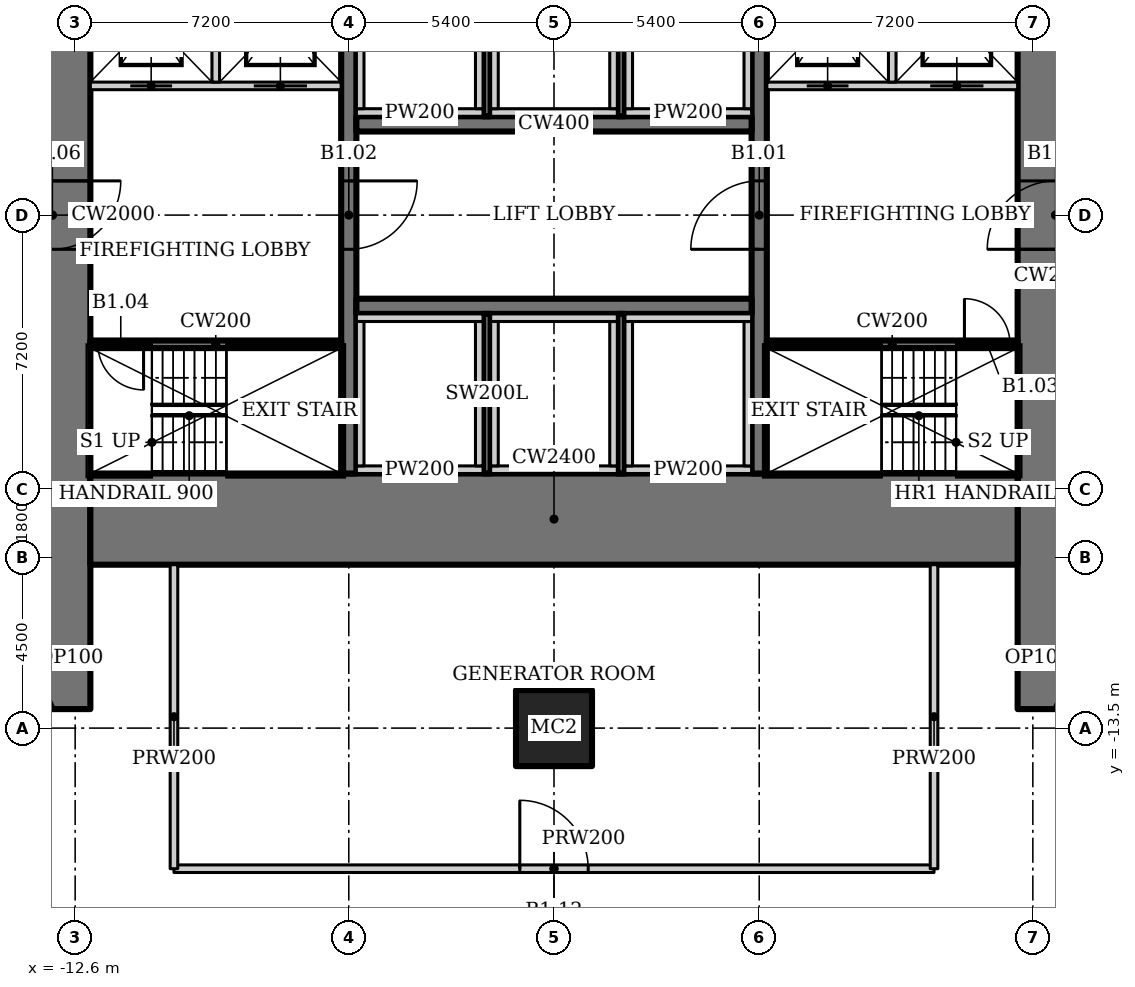
"""IFC4 building model, lengths in metres.
Left out: names, types, materials, properties, quantities, classifications, styles, units other than length and angle.
Written with IfcOpenShell. Run it as: python <this file> out.ifc"""

import sys

from ifc_helpers import new_model, si_unit, direction, frame, frame_2d, origin, origin_2d, place, context, subcontext, project, spatial, rectangle, hollow_rectangle, extrude, element, fill, save


model = new_model("IFC4")
c1 = context("Model", 3, precision=1e-05, world=origin(), true_north=direction((0.0, 1.0)))
c2 = subcontext(c1, "Body", "Model", "MODEL_VIEW")
j1 = project(units=[si_unit("LENGTHUNIT", "METRE"), si_unit("PLANEANGLEUNIT", "RADIAN")], contexts=[c1])
p1 = place(None, origin())
s1 = spatial("IfcSite", under=j1, at=p1, CompositionType="ELEMENT")
p2 = place(p1, origin())
s2 = spatial("IfcBuilding", under=s1, at=p2, CompositionType="ELEMENT")
p3 = place(p2, frame((0.0, 0.0, -5.5)))
s3 = spatial("IfcBuildingStorey", under=s2, at=p3, CompositionType="ELEMENT", Elevation=-5.5)
p4 = place(p3, frame((0.0, -13.5, 0.0), z_axis=(0.0, 0.0, 1.0), x_axis=(1.0, 0.0, 0.0)))
e1 = element("IfcColumn", 1, at=p4, inside=s3, PredefinedType="COLUMN", context=c2, shape_type="SweptSolid", body=[
    extrude(hollow_rectangle(XDim=2.0, YDim=2.0, WallThickness=0.17, at=origin_2d()), origin(), (0.0, 0.0, 1.0), 5.5),
])
p5 = place(p3, frame((13.2, -13.0, 0.0), z_axis=(0.0, 0.0, 1.0), x_axis=(0.0, 1.0, 0.0)))
e2 = element("IfcWall", 2, at=p5, inside=s3, PredefinedType="SHEAR", context=c2, shape_type="SweptSolid", body=[
    extrude(rectangle(XDim=26.0, YDim=2.0, at=frame_2d((13.0, 0.0))), origin(), (0.0, 0.0, 1.0), 5.5),
])
p6 = place(p5, frame((12.1, 0.0, 0.0)))
e3 = element("IfcOpeningElement", 3, at=p6, cuts=e2, PredefinedType="OPENING", context=c2, shape_type="SweptSolid", body=[
    extrude(rectangle(XDim=1.8, YDim=2.1, at=frame_2d((0.9, 1.05))), frame((0.0, 1.01, 0.0), z_axis=(0.0, -1.0, 0.0), x_axis=(1.0, 0.0, 0.0)), (0.0, 0.0, 1.0), 2.02),
])
p7 = place(p3, frame((-13.2, 13.0, 0.0), z_axis=(0.0, 0.0, 1.0), x_axis=(0.0, -1.0, 0.0)))
e4 = element("IfcWall", 4, at=p7, inside=s3, PredefinedType="SHEAR", context=c2, shape_type="SweptSolid", body=[
    extrude(rectangle(XDim=26.0, YDim=2.0, at=frame_2d((13.0, 0.0))), origin(), (0.0, 0.0, 1.0), 5.5),
])
p8 = place(p7, frame((12.1, 0.0, 0.0)))
e5 = element("IfcOpeningElement", 5, at=p8, cuts=e4, PredefinedType="OPENING", context=c2, shape_type="SweptSolid", body=[
    extrude(rectangle(XDim=1.8, YDim=2.1, at=frame_2d((0.9, 1.05))), frame((0.0, 1.01, 0.0), z_axis=(0.0, -1.0, 0.0), x_axis=(1.0, 0.0, 0.0)), (0.0, 0.0, 1.0), 2.02),
])
p9 = place(p3, frame((-12.2, -8.0, 0.0), z_axis=(0.0, 0.0, 1.0), x_axis=(1.0, 0.0, 0.0)))
e6 = element("IfcWall", 6, at=p9, inside=s3, PredefinedType="SHEAR", context=c2, shape_type="SweptSolid", body=[
    extrude(rectangle(XDim=24.4, YDim=2.4, at=frame_2d((12.2, 0.0))), origin(), (0.0, 0.0, 1.0), 5.5),
])
p10 = place(p3, frame((5.4, -6.8, 0.0), z_axis=(0.0, 0.0, 1.0), x_axis=(0.0, 1.0, 0.0)))
e7 = element("IfcWall", 7, at=p10, inside=s3, PredefinedType="SHEAR", context=c2, shape_type="SweptSolid", body=[
    extrude(rectangle(XDim=13.6, YDim=0.4, at=frame_2d((6.8, 0.0))), origin(), (0.0, 0.0, 1.0), 5.5),
])
p11 = place(p10, frame((5.9, 0.0, 0.0)))
e8 = element("IfcOpeningElement", 8, at=p11, cuts=e7, PredefinedType="OPENING", context=c2, shape_type="SweptSolid", body=[
    extrude(rectangle(XDim=1.8, YDim=2.1, at=frame_2d((0.9, 1.05))), frame((0.0, 0.21, 0.0), z_axis=(0.0, -1.0, 0.0), x_axis=(1.0, 0.0, 0.0)), (0.0, 0.0, 1.0), 0.42),
])
p12 = place(p3, frame((-5.4, 6.8, 0.0), z_axis=(0.0, 0.0, 1.0), x_axis=(0.0, -1.0, 0.0)))
e9 = element("IfcWall", 9, at=p12, inside=s3, PredefinedType="SHEAR", context=c2, shape_type="SweptSolid", body=[
    extrude(rectangle(XDim=13.6, YDim=0.4, at=frame_2d((6.8, 0.0))), origin(), (0.0, 0.0, 1.0), 5.5),
])
p13 = place(p12, frame((5.9, 0.0, 0.0)))
e10 = element("IfcOpeningElement", 10, at=p13, cuts=e9, PredefinedType="OPENING", context=c2, shape_type="SweptSolid", body=[
    extrude(rectangle(XDim=1.8, YDim=2.1, at=frame_2d((0.9, 1.05))), frame((0.0, 0.21, 0.0), z_axis=(0.0, -1.0, 0.0), x_axis=(1.0, 0.0, 0.0)), (0.0, 0.0, 1.0), 0.42),
])
p14 = place(p3, frame((-5.2, -2.4, 0.0), z_axis=(0.0, 0.0, 1.0), x_axis=(1.0, 0.0, 0.0)))
e11 = element("IfcWall", 11, at=p14, inside=s3, PredefinedType="SHEAR", context=c2, shape_type="SweptSolid", body=[
    extrude(rectangle(XDim=10.4, YDim=0.4, at=frame_2d((5.2, 0.0))), origin(), (0.0, 0.0, 1.0), 5.5),
])
for number, where, z_axis, x_axis in (
    (12, (-1.767, -2.6, 0.0), (0.0, 0.0, 1.0), (0.0, -1.0, 0.0)),
    (13, (1.767, -2.6, 0.0), (0.0, 0.0, 1.0), (0.0, -1.0, 0.0)),
):
    element("IfcWall", number, at=place(p3, frame(where, z_axis=z_axis, x_axis=x_axis)), inside=s3, PredefinedType="SOLIDWALL", context=c2, shape_type="SweptSolid", body=[
        extrude(rectangle(XDim=4.2, YDim=0.2, at=frame_2d((2.1, 0.0))), origin(), (0.0, 0.0, 1.0), 5.5),
    ])
p15 = place(p3, frame((5.2, 2.4, 0.0), z_axis=(0.0, 0.0, 1.0), x_axis=(-1.0, 0.0, 0.0)))
e14 = element("IfcWall", 14, at=p15, inside=s3, PredefinedType="SHEAR", context=c2, shape_type="SweptSolid", body=[
    extrude(rectangle(XDim=10.4, YDim=0.4, at=frame_2d((5.2, 0.0))), origin(), (0.0, 0.0, 1.0), 5.5),
])
for number, where, z_axis, x_axis in (
    (15, (-1.767, 2.6, 0.0), (0.0, 0.0, 1.0), (0.0, 1.0, 0.0)),
    (16, (1.767, 2.6, 0.0), (0.0, 0.0, 1.0), (0.0, 1.0, 0.0)),
):
    element("IfcWall", number, at=place(p3, frame(where, z_axis=z_axis, x_axis=x_axis)), inside=s3, PredefinedType="SOLIDWALL", context=c2, shape_type="SweptSolid", body=[
        extrude(rectangle(XDim=4.2, YDim=0.2, at=frame_2d((2.1, 0.0))), origin(), (0.0, 0.0, 1.0), 5.5),
    ])
p16 = place(p3, frame((5.6, -3.4, 0.0), z_axis=(0.0, 0.0, 1.0), x_axis=(1.0, 0.0, 0.0)))
e17 = element("IfcWall", 17, at=p16, inside=s3, PredefinedType="SHEAR", context=c2, shape_type="SweptSolid", body=[
    extrude(rectangle(XDim=6.6, YDim=0.2, at=frame_2d((3.3, 0.0))), origin(), (0.0, 0.0, 1.0), 5.5),
])
p17 = place(p16, frame((5.2, 0.0, 0.0)))
e18 = element("IfcOpeningElement", 18, at=p17, cuts=e17, PredefinedType="OPENING", context=c2, shape_type="SweptSolid", body=[
    extrude(rectangle(XDim=1.2, YDim=2.1, at=frame_2d((0.6, 1.05))), frame((0.0, 0.11, 0.0), z_axis=(0.0, -1.0, 0.0), x_axis=(1.0, 0.0, 0.0)), (0.0, 0.0, 1.0), 0.22),
])
p18 = place(p3, frame((12.2, 3.4, 0.0), z_axis=(0.0, 0.0, 1.0), x_axis=(-1.0, 0.0, 0.0)))
e19 = element("IfcWall", 19, at=p18, inside=s3, PredefinedType="SOLIDWALL", context=c2, shape_type="SweptSolid", body=[
    extrude(rectangle(XDim=6.6, YDim=0.2, at=frame_2d((3.3, 0.0))), origin(), (0.0, 0.0, 1.0), 5.5),
])
p19 = place(p18, frame((4.45, 0.0, 0.0)))
e20 = element("IfcOpeningElement", 20, at=p19, cuts=e19, PredefinedType="OPENING", context=c2, shape_type="SweptSolid", body=[
    extrude(rectangle(XDim=1.1, YDim=2.2, at=frame_2d((0.55, 1.1))), frame((0.0, 0.11, 0.0), z_axis=(0.0, -1.0, 0.0), x_axis=(1.0, 0.0, 0.0)), (0.0, 0.0, 1.0), 0.22),
])
p20 = place(p18, frame((0.9, 0.0, 0.0)))
e21 = element("IfcOpeningElement", 21, at=p20, cuts=e19, PredefinedType="OPENING", context=c2, shape_type="SweptSolid", body=[
    extrude(rectangle(XDim=1.4, YDim=2.2, at=frame_2d((0.7, 1.1))), frame((0.0, 0.11, 0.0), z_axis=(0.0, -1.0, 0.0), x_axis=(1.0, 0.0, 0.0)), (0.0, 0.0, 1.0), 0.22),
])
p21 = place(p3, frame((8.9, 3.5, 0.0), z_axis=(0.0, 0.0, 1.0), x_axis=(0.0, 1.0, 0.0)))
e22 = element("IfcWall", 22, at=p21, inside=s3, PredefinedType="SOLIDWALL", context=c2, shape_type="SweptSolid", body=[
    extrude(rectangle(XDim=3.3, YDim=0.2, at=frame_2d((1.65, 0.0))), origin(), (0.0, 0.0, 1.0), 5.5),
])
p22 = place(p3, frame((-5.6, -3.4, 0.0), z_axis=(0.0, 0.0, 1.0), x_axis=(-1.0, 0.0, 0.0)))
e23 = element("IfcWall", 23, at=p22, inside=s3, PredefinedType="SHEAR", context=c2, shape_type="SweptSolid", body=[
    extrude(rectangle(XDim=6.6, YDim=0.2, at=frame_2d((3.3, 0.0))), origin(), (0.0, 0.0, 1.0), 5.5),
])
p23 = place(p22, frame((5.2, 0.0, 0.0)))
e24 = element("IfcOpeningElement", 24, at=p23, cuts=e23, PredefinedType="OPENING", context=c2, shape_type="SweptSolid", body=[
    extrude(rectangle(XDim=1.2, YDim=2.1, at=frame_2d((0.6, 1.05))), frame((0.0, 0.11, 0.0), z_axis=(0.0, -1.0, 0.0), x_axis=(1.0, 0.0, 0.0)), (0.0, 0.0, 1.0), 0.22),
])
p24 = place(p3, frame((-12.2, 3.4, 0.0), z_axis=(0.0, 0.0, 1.0), x_axis=(1.0, 0.0, 0.0)))
e25 = element("IfcWall", 25, at=p24, inside=s3, PredefinedType="SOLIDWALL", context=c2, shape_type="SweptSolid", body=[
    extrude(rectangle(XDim=6.6, YDim=0.2, at=frame_2d((3.3, 0.0))), origin(), (0.0, 0.0, 1.0), 5.5),
])
p25 = place(p24, frame((1.05, 0.0, 0.0)))
e26 = element("IfcOpeningElement", 26, at=p25, cuts=e25, PredefinedType="OPENING", context=c2, shape_type="SweptSolid", body=[
    extrude(rectangle(XDim=1.1, YDim=2.2, at=frame_2d((0.55, 1.1))), frame((0.0, 0.11, 0.0), z_axis=(0.0, -1.0, 0.0), x_axis=(1.0, 0.0, 0.0)), (0.0, 0.0, 1.0), 0.22),
])
p26 = place(p24, frame((4.3, 0.0, 0.0)))
e27 = element("IfcOpeningElement", 27, at=p26, cuts=e25, PredefinedType="OPENING", context=c2, shape_type="SweptSolid", body=[
    extrude(rectangle(XDim=1.4, YDim=2.2, at=frame_2d((0.7, 1.1))), frame((0.0, 0.11, 0.0), z_axis=(0.0, -1.0, 0.0), x_axis=(1.0, 0.0, 0.0)), (0.0, 0.0, 1.0), 0.22),
])
p27 = place(p3, frame((-8.9, 3.5, 0.0), z_axis=(0.0, 0.0, 1.0), x_axis=(0.0, 1.0, 0.0)))
e28 = element("IfcWall", 28, at=p27, inside=s3, PredefinedType="SOLIDWALL", context=c2, shape_type="SweptSolid", body=[
    extrude(rectangle(XDim=3.3, YDim=0.2, at=frame_2d((1.65, 0.0))), origin(), (0.0, 0.0, 1.0), 5.5),
])
p28 = place(p3, frame((-10.0, -17.2, 0.0), z_axis=(0.0, 0.0, 1.0), x_axis=(1.0, 0.0, 0.0)))
e29 = element("IfcWall", 29, at=p28, inside=s3, PredefinedType="SOLIDWALL", context=c2, shape_type="SweptSolid", body=[
    extrude(rectangle(XDim=20.0, YDim=0.2, at=frame_2d((10.0, 0.0))), origin(), (0.0, 0.0, 1.0), 5.05),
])
p29 = place(p28, frame((9.1, 0.0, 0.0)))
e30 = element("IfcOpeningElement", 30, at=p29, cuts=e29, PredefinedType="OPENING", context=c2, shape_type="SweptSolid", body=[
    extrude(rectangle(XDim=1.8, YDim=2.1, at=frame_2d((0.9, 1.05))), frame((0.0, 0.11, 0.0), z_axis=(0.0, -1.0, 0.0), x_axis=(1.0, 0.0, 0.0)), (0.0, 0.0, 1.0), 0.22),
])
for number, where, z_axis, x_axis in (
    (31, (-10.0, -9.2, 0.0), (0.0, 0.0, 1.0), (0.0, -1.0, 0.0)),
    (32, (10.0, -9.2, 0.0), (0.0, 0.0, 1.0), (0.0, -1.0, 0.0)),
):
    element("IfcWall", number, at=place(p3, frame(where, z_axis=z_axis, x_axis=x_axis)), inside=s3, PredefinedType="SOLIDWALL", context=c2, shape_type="SweptSolid", body=[
        extrude(rectangle(XDim=8.0, YDim=0.2, at=frame_2d((4.0, 0.0))), origin(), (0.0, 0.0, 1.0), 5.05),
    ])
for number, where, z_axis, x_axis in (
    (33, (13.2, -13.0, 0.0), (0.0, 0.0, 1.0), (0.42, 0.907, 0.0)),
    (34, (-13.2, -13.0, 0.0), (0.0, 0.0, 1.0), (-0.42, 0.907, 0.0)),
):
    element("IfcWall", number, at=place(p3, frame(where, z_axis=z_axis, x_axis=x_axis)), inside=s3, PredefinedType="PARTITIONING", context=c2, shape_type="SweptSolid", body=[
        extrude(rectangle(XDim=2.975, YDim=0.1, at=frame_2d((1.488, 0.0))), origin(), (0.0, 0.0, 1.0), 5.05),
    ])
p30 = place(p3, frame((-5.2, 2.7, 3.7), z_axis=(0.0, 0.0, 1.0), x_axis=(1.0, 0.0, 0.0)))
e35 = element("IfcWall", 35, at=p30, inside=s3, PredefinedType="SOLIDWALL", context=c2, shape_type="SweptSolid", body=[
    extrude(rectangle(XDim=3.333, YDim=0.2, at=frame_2d((1.667, 0.0))), origin(), (0.0, 0.0, 1.0), 1.35),
])
for number, where, z_axis, x_axis in (
    (36, (-1.967, 2.8, 3.7), (0.0, 0.0, 1.0), (0.0, 1.0, 0.0)),
    (37, (-5.1, 6.6, 3.7), (0.0, 0.0, 1.0), (0.0, -1.0, 0.0)),
):
    element("IfcWall", number, at=place(p3, frame(where, z_axis=z_axis, x_axis=x_axis)), inside=s3, PredefinedType="SOLIDWALL", context=c2, shape_type="SweptSolid", body=[
        extrude(rectangle(XDim=3.8, YDim=0.2, at=frame_2d((1.9, 0.0))), origin(), (0.0, 0.0, 1.0), 1.35),
    ])
p31 = place(p3, frame((-5.2, -6.7, 3.7), z_axis=(0.0, 0.0, 1.0), x_axis=(1.0, 0.0, 0.0)))
e38 = element("IfcWall", 38, at=p31, inside=s3, PredefinedType="SOLIDWALL", context=c2, shape_type="SweptSolid", body=[
    extrude(rectangle(XDim=3.333, YDim=0.2, at=frame_2d((1.667, 0.0))), origin(), (0.0, 0.0, 1.0), 1.35),
])
p32 = place(p3, frame((-1.967, -6.6, 3.7), z_axis=(0.0, 0.0, 1.0), x_axis=(0.0, 1.0, 0.0)))
e39 = element("IfcWall", 39, at=p32, inside=s3, PredefinedType="SOLIDWALL", context=c2, shape_type="SweptSolid", body=[
    extrude(rectangle(XDim=3.8, YDim=0.2, at=frame_2d((1.9, 0.0))), origin(), (0.0, 0.0, 1.0), 1.35),
])
p33 = place(p3, frame((-1.867, -2.7, 3.7), z_axis=(0.0, 0.0, 1.0), x_axis=(-1.0, 0.0, 0.0)))
e40 = element("IfcWall", 40, at=p33, inside=s3, PredefinedType="SOLIDWALL", context=c2, shape_type="SweptSolid", body=[
    extrude(rectangle(XDim=3.333, YDim=0.2, at=frame_2d((1.667, 0.0))), origin(), (0.0, 0.0, 1.0), 1.35),
])
p34 = place(p3, frame((-5.1, -2.8, 3.7), z_axis=(0.0, 0.0, 1.0), x_axis=(0.0, -1.0, 0.0)))
e41 = element("IfcWall", 41, at=p34, inside=s3, PredefinedType="SOLIDWALL", context=c2, shape_type="SweptSolid", body=[
    extrude(rectangle(XDim=3.8, YDim=0.2, at=frame_2d((1.9, 0.0))), origin(), (0.0, 0.0, 1.0), 1.35),
])
p35 = place(p3, frame((-1.667, 2.7, 3.7), z_axis=(0.0, 0.0, 1.0), x_axis=(1.0, 0.0, 0.0)))
e42 = element("IfcWall", 42, at=p35, inside=s3, PredefinedType="SOLIDWALL", context=c2, shape_type="SweptSolid", body=[
    extrude(rectangle(XDim=3.333, YDim=0.2, at=frame_2d((1.667, 0.0))), origin(), (0.0, 0.0, 1.0), 1.35),
])
for number, where, z_axis, x_axis in (
    (43, (1.567, 2.8, 3.7), (0.0, 0.0, 1.0), (0.0, 1.0, 0.0)),
    (44, (-1.567, 6.6, 3.7), (0.0, 0.0, 1.0), (0.0, -1.0, 0.0)),
):
    element("IfcWall", number, at=place(p3, frame(where, z_axis=z_axis, x_axis=x_axis)), inside=s3, PredefinedType="SOLIDWALL", context=c2, shape_type="SweptSolid", body=[
        extrude(rectangle(XDim=3.8, YDim=0.2, at=frame_2d((1.9, 0.0))), origin(), (0.0, 0.0, 1.0), 1.35),
    ])
p36 = place(p3, frame((-1.667, -6.7, 3.7), z_axis=(0.0, 0.0, 1.0), x_axis=(1.0, 0.0, 0.0)))
e45 = element("IfcWall", 45, at=p36, inside=s3, PredefinedType="SOLIDWALL", context=c2, shape_type="SweptSolid", body=[
    extrude(rectangle(XDim=3.333, YDim=0.2, at=frame_2d((1.667, 0.0))), origin(), (0.0, 0.0, 1.0), 1.35),
])
p37 = place(p3, frame((1.567, -6.6, 3.7), z_axis=(0.0, 0.0, 1.0), x_axis=(0.0, 1.0, 0.0)))
e46 = element("IfcWall", 46, at=p37, inside=s3, PredefinedType="SOLIDWALL", context=c2, shape_type="SweptSolid", body=[
    extrude(rectangle(XDim=3.8, YDim=0.2, at=frame_2d((1.9, 0.0))), origin(), (0.0, 0.0, 1.0), 1.35),
])
p38 = place(p3, frame((1.667, -2.7, 3.7), z_axis=(0.0, 0.0, 1.0), x_axis=(-1.0, 0.0, 0.0)))
e47 = element("IfcWall", 47, at=p38, inside=s3, PredefinedType="SOLIDWALL", context=c2, shape_type="SweptSolid", body=[
    extrude(rectangle(XDim=3.333, YDim=0.2, at=frame_2d((1.667, 0.0))), origin(), (0.0, 0.0, 1.0), 1.35),
])
p39 = place(p3, frame((-1.567, -2.8, 3.7), z_axis=(0.0, 0.0, 1.0), x_axis=(0.0, -1.0, 0.0)))
e48 = element("IfcWall", 48, at=p39, inside=s3, PredefinedType="SOLIDWALL", context=c2, shape_type="SweptSolid", body=[
    extrude(rectangle(XDim=3.8, YDim=0.2, at=frame_2d((1.9, 0.0))), origin(), (0.0, 0.0, 1.0), 1.35),
])
p40 = place(p3, frame((1.867, 2.7, 3.7), z_axis=(0.0, 0.0, 1.0), x_axis=(1.0, 0.0, 0.0)))
e49 = element("IfcWall", 49, at=p40, inside=s3, PredefinedType="SOLIDWALL", context=c2, shape_type="SweptSolid", body=[
    extrude(rectangle(XDim=3.333, YDim=0.2, at=frame_2d((1.667, 0.0))), origin(), (0.0, 0.0, 1.0), 1.35),
])
for number, where, z_axis, x_axis in (
    (50, (5.1, 2.8, 3.7), (0.0, 0.0, 1.0), (0.0, 1.0, 0.0)),
    (51, (1.967, 6.6, 3.7), (0.0, 0.0, 1.0), (0.0, -1.0, 0.0)),
):
    element("IfcWall", number, at=place(p3, frame(where, z_axis=z_axis, x_axis=x_axis)), inside=s3, PredefinedType="SOLIDWALL", context=c2, shape_type="SweptSolid", body=[
        extrude(rectangle(XDim=3.8, YDim=0.2, at=frame_2d((1.9, 0.0))), origin(), (0.0, 0.0, 1.0), 1.35),
    ])
p41 = place(p3, frame((1.867, -6.7, 3.7), z_axis=(0.0, 0.0, 1.0), x_axis=(1.0, 0.0, 0.0)))
e52 = element("IfcWall", 52, at=p41, inside=s3, PredefinedType="SOLIDWALL", context=c2, shape_type="SweptSolid", body=[
    extrude(rectangle(XDim=3.333, YDim=0.2, at=frame_2d((1.667, 0.0))), origin(), (0.0, 0.0, 1.0), 1.35),
])
p42 = place(p3, frame((5.1, -6.6, 3.7), z_axis=(0.0, 0.0, 1.0), x_axis=(0.0, 1.0, 0.0)))
e53 = element("IfcWall", 53, at=p42, inside=s3, PredefinedType="SOLIDWALL", context=c2, shape_type="SweptSolid", body=[
    extrude(rectangle(XDim=3.8, YDim=0.2, at=frame_2d((1.9, 0.0))), origin(), (0.0, 0.0, 1.0), 1.35),
])
p43 = place(p3, frame((5.2, -2.7, 3.7), z_axis=(0.0, 0.0, 1.0), x_axis=(-1.0, 0.0, 0.0)))
e54 = element("IfcWall", 54, at=p43, inside=s3, PredefinedType="SOLIDWALL", context=c2, shape_type="SweptSolid", body=[
    extrude(rectangle(XDim=3.333, YDim=0.2, at=frame_2d((1.667, 0.0))), origin(), (0.0, 0.0, 1.0), 1.35),
])
p44 = place(p3, frame((1.967, -2.8, 3.7), z_axis=(0.0, 0.0, 1.0), x_axis=(0.0, -1.0, 0.0)))
e55 = element("IfcWall", 55, at=p44, inside=s3, PredefinedType="SOLIDWALL", context=c2, shape_type="SweptSolid", body=[
    extrude(rectangle(XDim=3.8, YDim=0.2, at=frame_2d((1.9, 0.0))), origin(), (0.0, 0.0, 1.0), 1.35),
])
p45 = place(p11, origin())
e56 = element("IfcDoor", 56, at=p45, inside=s3, OperationType="DOUBLE_DOOR_DOUBLE_SWING", PredefinedType="DOOR", context=c2, shape_type="SweptSolid", body=[
    extrude(rectangle(XDim=1.8, YDim=2.1, at=frame_2d((0.9, 1.05))), frame((0.0, 0.025, 0.0), z_axis=(0.0, -1.0, 0.0), x_axis=(1.0, 0.0, 0.0)), (0.0, 0.0, 1.0), 0.05),
])
fill(e8, e56)
p46 = place(p13, origin())
e57 = element("IfcDoor", 57, at=p46, inside=s3, OperationType="DOUBLE_DOOR_DOUBLE_SWING", PredefinedType="DOOR", context=c2, shape_type="SweptSolid", body=[
    extrude(rectangle(XDim=1.8, YDim=2.1, at=frame_2d((0.9, 1.05))), frame((0.0, 0.025, 0.0), z_axis=(0.0, -1.0, 0.0), x_axis=(1.0, 0.0, 0.0)), (0.0, 0.0, 1.0), 0.05),
])
fill(e10, e57)
p47 = place(p17, origin())
e58 = element("IfcDoor", 58, at=p47, inside=s3, OperationType="SINGLE_SWING_RIGHT", PredefinedType="DOOR", context=c2, shape_type="SweptSolid", body=[
    extrude(rectangle(XDim=1.2, YDim=2.1, at=frame_2d((0.6, 1.05))), frame((0.0, 0.025, 0.0), z_axis=(0.0, -1.0, 0.0), x_axis=(1.0, 0.0, 0.0)), (0.0, 0.0, 1.0), 0.05),
])
fill(e18, e58)
p48 = place(p23, origin())
e59 = element("IfcDoor", 59, at=p48, inside=s3, OperationType="SINGLE_SWING_RIGHT", PredefinedType="DOOR", context=c2, shape_type="SweptSolid", body=[
    extrude(rectangle(XDim=1.2, YDim=2.1, at=frame_2d((0.6, 1.05))), frame((0.0, 0.025, 0.0), z_axis=(0.0, -1.0, 0.0), x_axis=(1.0, 0.0, 0.0)), (0.0, 0.0, 1.0), 0.05),
])
fill(e24, e59)
p49 = place(p6, origin())
e60 = element("IfcDoor", 60, at=p49, inside=s3, OperationType="DOUBLE_DOOR_DOUBLE_SWING", PredefinedType="DOOR", context=c2, shape_type="SweptSolid", body=[
    extrude(rectangle(XDim=1.8, YDim=2.1, at=frame_2d((0.9, 1.05))), frame((0.0, 0.025, 0.0), z_axis=(0.0, -1.0, 0.0), x_axis=(1.0, 0.0, 0.0)), (0.0, 0.0, 1.0), 0.05),
])
fill(e3, e60)
p50 = place(p8, origin())
e61 = element("IfcDoor", 61, at=p50, inside=s3, OperationType="DOUBLE_DOOR_DOUBLE_SWING", PredefinedType="DOOR", context=c2, shape_type="SweptSolid", body=[
    extrude(rectangle(XDim=1.8, YDim=2.1, at=frame_2d((0.9, 1.05))), frame((0.0, 0.025, 0.0), z_axis=(0.0, -1.0, 0.0), x_axis=(1.0, 0.0, 0.0)), (0.0, 0.0, 1.0), 0.05),
])
fill(e5, e61)
p51 = place(p25, origin())
e62 = element("IfcDoor", 62, at=p51, inside=s3, OperationType="DOUBLE_DOOR_SLIDING", PredefinedType="DOOR", context=c2, shape_type="SweptSolid", body=[
    extrude(rectangle(XDim=1.1, YDim=2.2, at=frame_2d((0.55, 1.1))), frame((0.0, 0.025, 0.0), z_axis=(0.0, -1.0, 0.0), x_axis=(1.0, 0.0, 0.0)), (0.0, 0.0, 1.0), 0.05),
])
fill(e26, e62)
p52 = place(p26, origin())
e63 = element("IfcDoor", 63, at=p52, inside=s3, OperationType="DOUBLE_DOOR_SLIDING", PredefinedType="DOOR", context=c2, shape_type="SweptSolid", body=[
    extrude(rectangle(XDim=1.4, YDim=2.2, at=frame_2d((0.7, 1.1))), frame((0.0, 0.025, 0.0), z_axis=(0.0, -1.0, 0.0), x_axis=(1.0, 0.0, 0.0)), (0.0, 0.0, 1.0), 0.05),
])
fill(e27, e63)
p53 = place(p19, origin())
e64 = element("IfcDoor", 64, at=p53, inside=s3, OperationType="DOUBLE_DOOR_SLIDING", PredefinedType="DOOR", context=c2, shape_type="SweptSolid", body=[
    extrude(rectangle(XDim=1.1, YDim=2.2, at=frame_2d((0.55, 1.1))), frame((0.0, 0.025, 0.0), z_axis=(0.0, -1.0, 0.0), x_axis=(1.0, 0.0, 0.0)), (0.0, 0.0, 1.0), 0.05),
])
fill(e20, e64)
p54 = place(p20, origin())
e65 = element("IfcDoor", 65, at=p54, inside=s3, OperationType="DOUBLE_DOOR_SLIDING", PredefinedType="DOOR", context=c2, shape_type="SweptSolid", body=[
    extrude(rectangle(XDim=1.4, YDim=2.2, at=frame_2d((0.7, 1.1))), frame((0.0, 0.025, 0.0), z_axis=(0.0, -1.0, 0.0), x_axis=(1.0, 0.0, 0.0)), (0.0, 0.0, 1.0), 0.05),
])
fill(e21, e65)
p55 = place(p29, origin())
e66 = element("IfcDoor", 66, at=p55, inside=s3, OperationType="DOUBLE_DOOR_DOUBLE_SWING", PredefinedType="DOOR", context=c2, shape_type="SweptSolid", body=[
    extrude(rectangle(XDim=1.8, YDim=2.1, at=frame_2d((0.9, 1.05))), frame((0.0, 0.025, 0.0), z_axis=(0.0, -1.0, 0.0), x_axis=(1.0, 0.0, 0.0)), (0.0, 0.0, 1.0), 0.05),
])
fill(e30, e66)
save(model, sys.argv[1])
